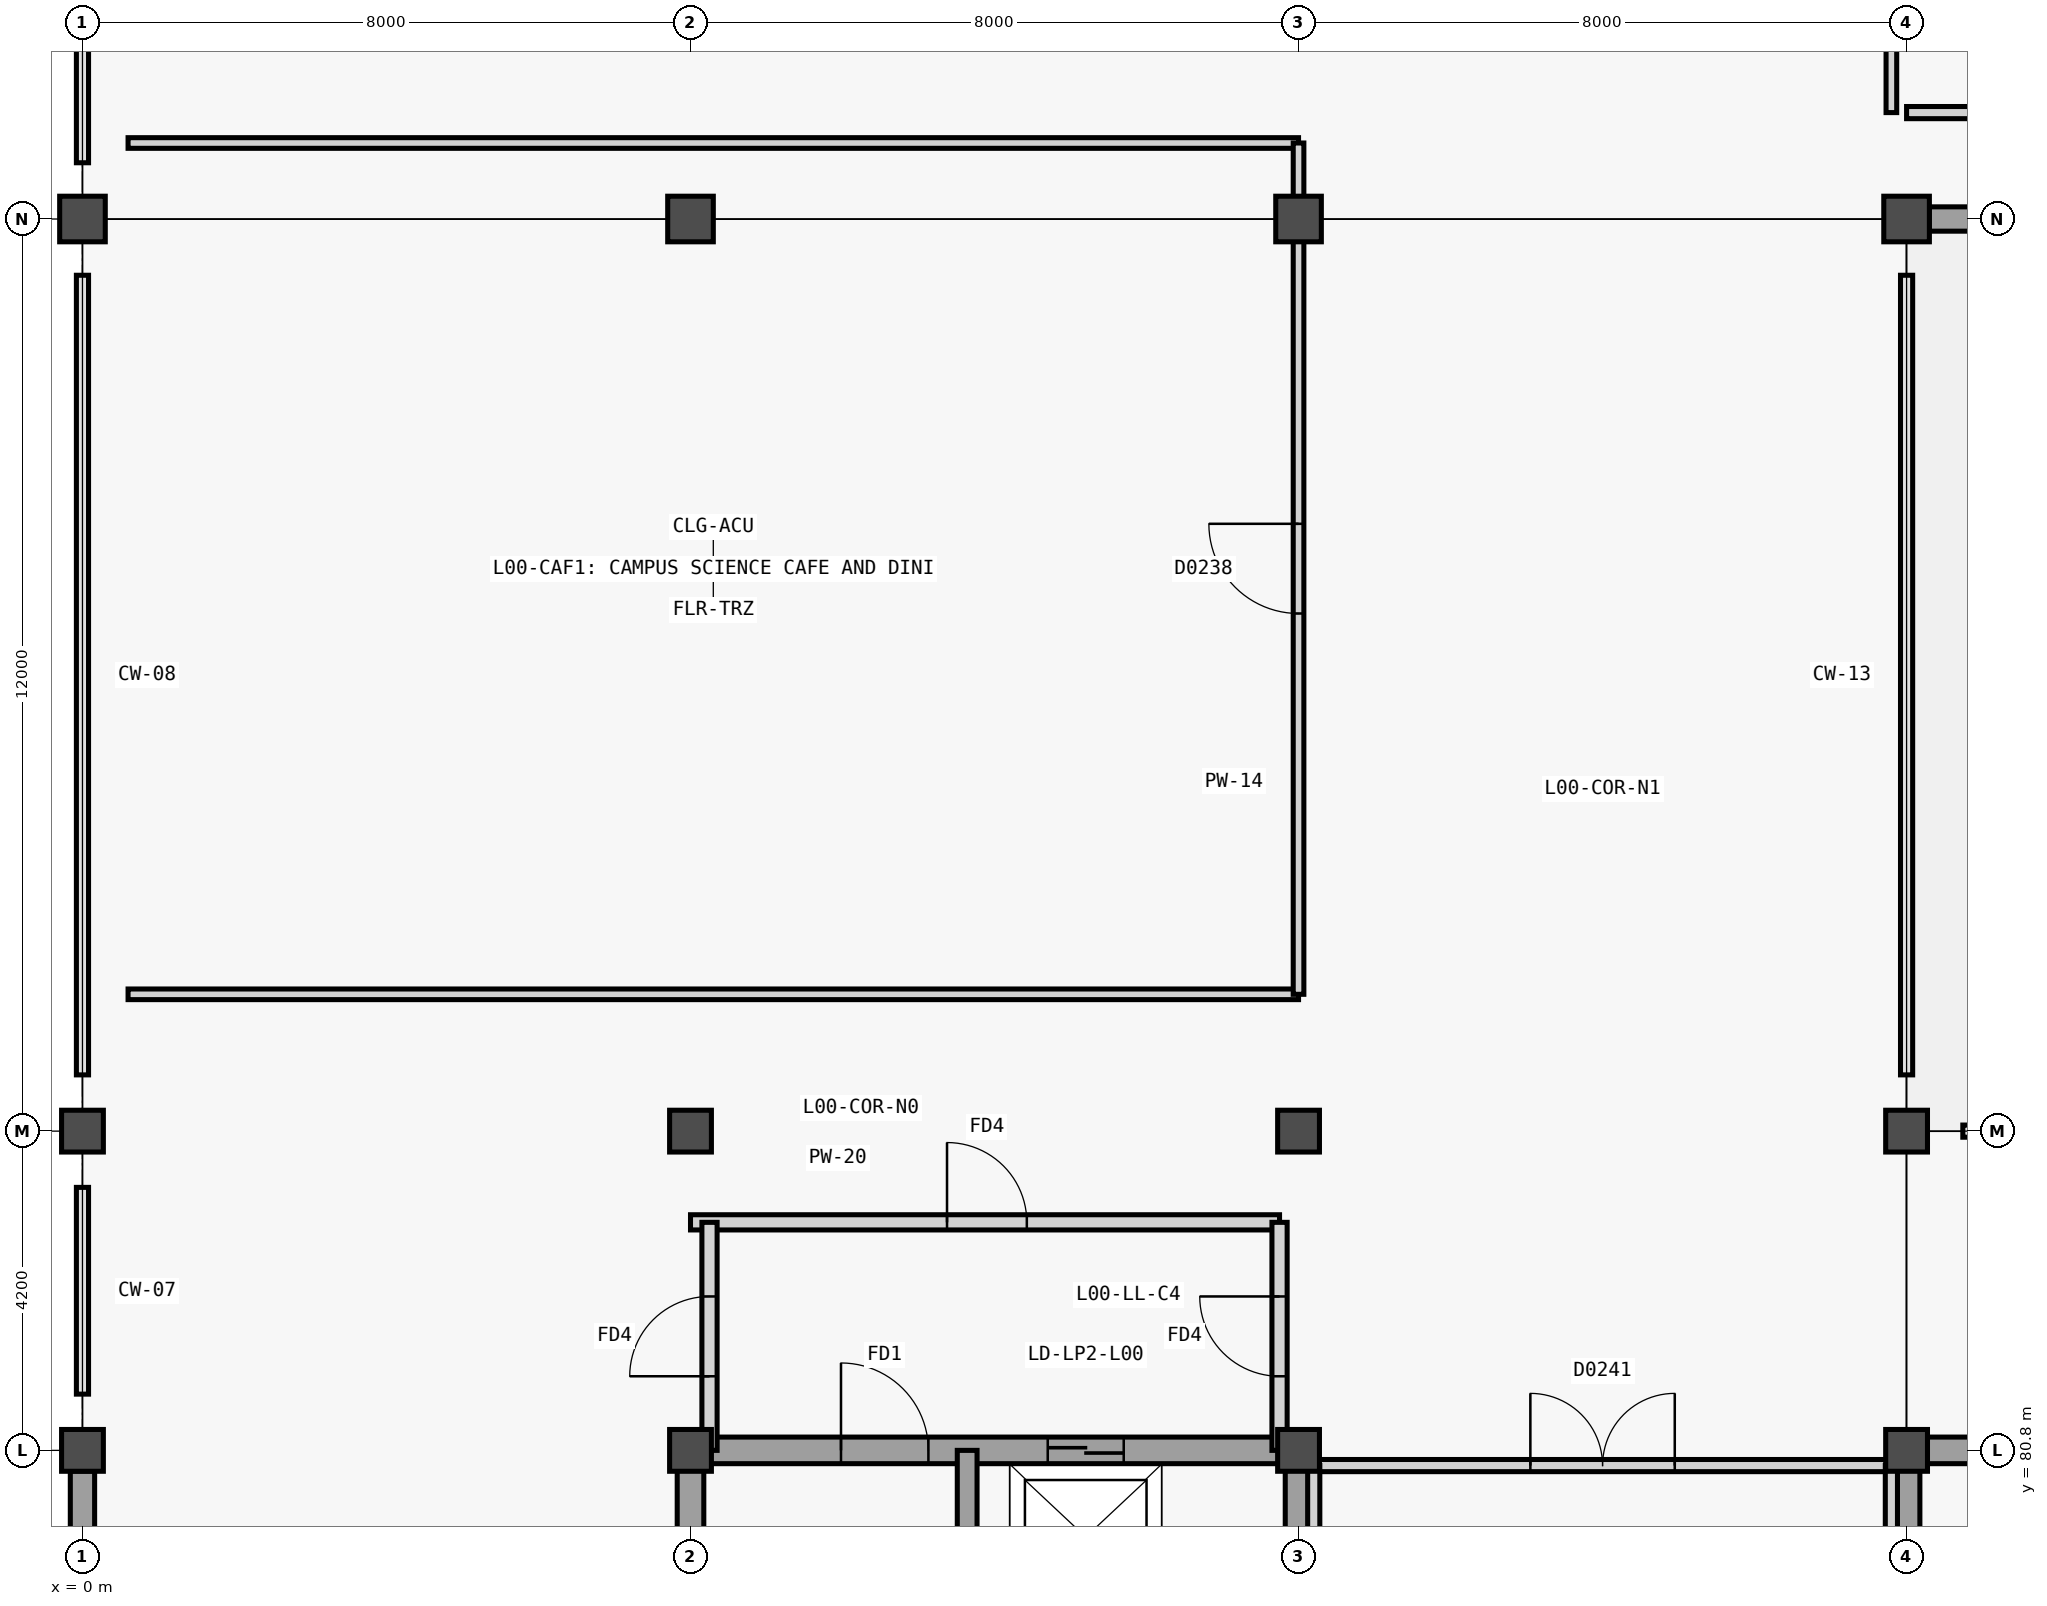
"""IFC4 building model, lengths in metres.
Left out: names, types, materials, properties, quantities, classifications, styles, units other than length and angle.
Written with IfcOpenShell. Run it as: python <this file> out.ifc"""

import sys

from ifc_helpers import new_model, si_unit, direction, frame, frame_2d, origin, origin_2d, place, context, subcontext, project, spatial, rectangle, extrude, element, fill, save


model = new_model("IFC4")
c1 = context("Model", 3, precision=1e-05, world=origin(), true_north=direction((0.0, 1.0)))
c2 = subcontext(c1, "Body", "Model", "MODEL_VIEW")
j1 = project(units=[si_unit("LENGTHUNIT", "METRE"), si_unit("PLANEANGLEUNIT", "RADIAN")], contexts=[c1])
p1 = place(None, origin())
s1 = spatial("IfcSite", under=j1, at=p1, CompositionType="ELEMENT")
p2 = place(p1, origin())
s2 = spatial("IfcBuilding", under=s1, at=p2, CompositionType="ELEMENT")
p3 = place(p2, origin())
s3 = spatial("IfcBuildingStorey", under=s2, at=p3, CompositionType="ELEMENT", Elevation=0.0)
for number, where, z_axis, x_axis in (
    (1, (0.0, 80.8, 0.0), (0.0, 0.0, 1.0), (1.0, 0.0, 0.0)),
    (2, (0.0, 85.0, 0.0), (0.0, 0.0, 1.0), (1.0, 0.0, 0.0)),
):
    element("IfcColumn", number, at=place(p3, frame(where, z_axis=z_axis, x_axis=x_axis)), inside=s3, PredefinedType="COLUMN", context=c2, shape_type="SweptSolid", body=[
        extrude(rectangle(XDim=0.55, YDim=0.55, at=origin_2d()), origin(), (0.0, 0.0, 1.0), 5.4),
    ])
p4 = place(p3, frame((0.0, 97.0, 0.0), z_axis=(0.0, 0.0, 1.0), x_axis=(1.0, 0.0, 0.0)))
e3 = element("IfcColumn", 3, at=p4, inside=s3, PredefinedType="COLUMN", context=c2, shape_type="SweptSolid", body=[
    extrude(rectangle(XDim=0.6, YDim=0.6, at=origin_2d()), origin(), (0.0, 0.0, 1.0), 5.4),
])
for number, where, z_axis, x_axis in (
    (4, (8.0, 80.8, 0.0), (0.0, 0.0, 1.0), (1.0, 0.0, 0.0)),
    (5, (8.0, 85.0, 0.0), (0.0, 0.0, 1.0), (1.0, 0.0, 0.0)),
):
    element("IfcColumn", number, at=place(p3, frame(where, z_axis=z_axis, x_axis=x_axis)), inside=s3, PredefinedType="COLUMN", context=c2, shape_type="SweptSolid", body=[
        extrude(rectangle(XDim=0.55, YDim=0.55, at=origin_2d()), origin(), (0.0, 0.0, 1.0), 5.4),
    ])
p5 = place(p3, frame((8.0, 97.0, 0.0), z_axis=(0.0, 0.0, 1.0), x_axis=(1.0, 0.0, 0.0)))
e6 = element("IfcColumn", 6, at=p5, inside=s3, PredefinedType="COLUMN", context=c2, shape_type="SweptSolid", body=[
    extrude(rectangle(XDim=0.6, YDim=0.6, at=origin_2d()), origin(), (0.0, 0.0, 1.0), 5.4),
])
for number, where, z_axis, x_axis in (
    (7, (16.0, 80.8, 0.0), (0.0, 0.0, 1.0), (1.0, 0.0, 0.0)),
    (8, (16.0, 85.0, 0.0), (0.0, 0.0, 1.0), (1.0, 0.0, 0.0)),
):
    element("IfcColumn", number, at=place(p3, frame(where, z_axis=z_axis, x_axis=x_axis)), inside=s3, PredefinedType="COLUMN", context=c2, shape_type="SweptSolid", body=[
        extrude(rectangle(XDim=0.55, YDim=0.55, at=origin_2d()), origin(), (0.0, 0.0, 1.0), 5.4),
    ])
p6 = place(p3, frame((16.0, 97.0, 0.0), z_axis=(0.0, 0.0, 1.0), x_axis=(1.0, 0.0, 0.0)))
e9 = element("IfcColumn", 9, at=p6, inside=s3, PredefinedType="COLUMN", context=c2, shape_type="SweptSolid", body=[
    extrude(rectangle(XDim=0.6, YDim=0.6, at=origin_2d()), origin(), (0.0, 0.0, 1.0), 5.4),
])
for number, where, z_axis, x_axis in (
    (10, (24.0, 80.8, 0.0), (0.0, 0.0, 1.0), (1.0, 0.0, 0.0)),
    (11, (24.0, 85.0, 0.0), (0.0, 0.0, 1.0), (1.0, 0.0, 0.0)),
):
    element("IfcColumn", number, at=place(p3, frame(where, z_axis=z_axis, x_axis=x_axis)), inside=s3, PredefinedType="COLUMN", context=c2, shape_type="SweptSolid", body=[
        extrude(rectangle(XDim=0.55, YDim=0.55, at=origin_2d()), origin(), (0.0, 0.0, 1.0), 5.4),
    ])
p7 = place(p3, frame((24.0, 97.0, 0.0), z_axis=(0.0, 0.0, 1.0), x_axis=(1.0, 0.0, 0.0)))
e12 = element("IfcColumn", 12, at=p7, inside=s3, PredefinedType="COLUMN", context=c2, shape_type="SweptSolid", body=[
    extrude(rectangle(XDim=0.6, YDim=0.6, at=origin_2d()), origin(), (0.0, 0.0, 1.0), 5.4),
])
p8 = place(p3, frame((0.0, 72.673, 0.0), z_axis=(0.0, 0.0, 1.0), x_axis=(0.0, 1.0, 0.0)))
e13 = element("IfcWall", 13, at=p8, inside=s3, PredefinedType="SOLIDWALL", context=c2, shape_type="SweptSolid", body=[
    extrude(rectangle(XDim=7.854, YDim=0.32, at=frame_2d((3.927, 0.0))), origin(), (0.0, 0.0, 1.0), 5.12),
])
p9 = place(p8, frame((2.307, 0.0, 0.0)))
e14 = element("IfcOpeningElement", 14, at=p9, cuts=e13, PredefinedType="OPENING", context=c2, shape_type="SweptSolid", body=[
    extrude(rectangle(XDim=1.65, YDim=2.2, at=frame_2d((0.825, 1.1))), frame((0.0, 0.17, 0.0), z_axis=(0.0, -1.0, 0.0), x_axis=(1.0, 0.0, 0.0)), (0.0, 0.0, 1.0), 0.34),
])
p10 = place(p3, frame((31.702, 97.0, 0.0), z_axis=(0.0, 0.0, 1.0), x_axis=(-1.0, 0.0, 0.0)))
e15 = element("IfcWall", 15, at=p10, inside=s3, PredefinedType="SOLIDWALL", context=c2, shape_type="SweptSolid", body=[
    extrude(rectangle(XDim=7.404, YDim=0.32, at=frame_2d((3.702, 0.0))), origin(), (0.0, 0.0, 1.0), 5.12),
])
p11 = place(p10, frame((2.422, 0.0, 0.0)))
e16 = element("IfcOpeningElement", 16, at=p11, cuts=e15, PredefinedType="OPENING", context=c2, shape_type="SweptSolid", body=[
    extrude(rectangle(XDim=2.0, YDim=2.4, at=frame_2d((1.0, 1.2))), frame((0.0, 0.17, 0.0), z_axis=(0.0, -1.0, 0.0), x_axis=(1.0, 0.0, 0.0)), (0.0, 0.0, 1.0), 0.34),
])
for number, where, z_axis, x_axis in (
    (17, (8.0, 72.4, 0.0), (0.0, 0.0, 1.0), (0.0, 1.0, 0.0)),
    (18, (16.0, 72.4, 0.0), (0.0, 0.0, 1.0), (0.0, 1.0, 0.0)),
):
    element("IfcWall", number, at=place(p3, frame(where, z_axis=z_axis, x_axis=x_axis)), inside=s3, PredefinedType="SHEAR", context=c2, shape_type="SweptSolid", body=[
        extrude(rectangle(XDim=8.4, YDim=0.35, at=frame_2d((4.2, 0.0))), origin(), (0.0, 0.0, 1.0), 5.4),
    ])
p12 = place(p3, frame((8.0, 80.8, 0.0), z_axis=(0.0, 0.0, 1.0), x_axis=(1.0, 0.0, 0.0)))
e19 = element("IfcWall", 19, at=p12, inside=s3, PredefinedType="SHEAR", context=c2, shape_type="SweptSolid", body=[
    extrude(rectangle(XDim=8.0, YDim=0.35, at=frame_2d((4.0, 0.0))), origin(), (0.0, 0.0, 1.0), 5.4),
])
p13 = place(p12, frame((1.98, 0.0, 0.0)))
e20 = element("IfcOpeningElement", 20, at=p13, cuts=e19, PredefinedType="OPENING", context=c2, shape_type="SweptSolid", body=[
    extrude(rectangle(XDim=1.15, YDim=2.2, at=frame_2d((0.575, 1.1))), frame((0.0, 0.185, 0.0), z_axis=(0.0, -1.0, 0.0), x_axis=(1.0, 0.0, 0.0)), (0.0, 0.0, 1.0), 0.37),
])
p14 = place(p12, frame((4.7, 0.0, 0.0)))
e21 = element("IfcOpeningElement", 21, at=p14, cuts=e19, PredefinedType="OPENING", context=c2, shape_type="SweptSolid", body=[
    extrude(rectangle(XDim=1.0, YDim=2.15, at=frame_2d((0.5, 1.075))), frame((0.0, 0.185, 0.0), z_axis=(0.0, -1.0, 0.0), x_axis=(1.0, 0.0, 0.0)), (0.0, 0.0, 1.0), 0.37),
])
p15 = place(p3, frame((11.64, 72.4, 0.0), z_axis=(0.0, 0.0, 1.0), x_axis=(0.0, 1.0, 0.0)))
e22 = element("IfcWall", 22, at=p15, inside=s3, PredefinedType="SHEAR", context=c2, shape_type="SweptSolid", body=[
    extrude(rectangle(XDim=8.4, YDim=0.26, at=frame_2d((4.2, 0.0))), origin(), (0.0, 0.0, 1.0), 5.4),
])
p16 = place(p3, frame((8.0, 83.8, 0.0), z_axis=(0.0, 0.0, 1.0), x_axis=(1.0, 0.0, 0.0)))
e23 = element("IfcWall", 23, at=p16, inside=s3, PredefinedType="PARTITIONING", context=c2, shape_type="SweptSolid", body=[
    extrude(rectangle(XDim=7.75, YDim=0.2, at=frame_2d((3.875, 0.0))), origin(), (0.0, 0.0, 1.0), 5.12),
])
p17 = place(p16, frame((3.375, 0.0, 0.0)))
e24 = element("IfcOpeningElement", 24, at=p17, cuts=e23, PredefinedType="OPENING", context=c2, shape_type="SweptSolid", body=[
    extrude(rectangle(XDim=1.05, YDim=2.15, at=frame_2d((0.525, 1.075))), frame((0.0, 0.11, 0.0), z_axis=(0.0, -1.0, 0.0), x_axis=(1.0, 0.0, 0.0)), (0.0, 0.0, 1.0), 0.22),
])
p18 = place(p3, frame((15.75, 80.8, 0.0), z_axis=(0.0, 0.0, 1.0), x_axis=(0.0, 1.0, 0.0)))
e25 = element("IfcWall", 25, at=p18, inside=s3, PredefinedType="PARTITIONING", context=c2, shape_type="SweptSolid", body=[
    extrude(rectangle(XDim=3.0, YDim=0.2, at=frame_2d((1.5, 0.0))), origin(), (0.0, 0.0, 1.0), 4.49),
])
p19 = place(p18, frame((0.975, 0.0, 0.0)))
e26 = element("IfcOpeningElement", 26, at=p19, cuts=e25, PredefinedType="OPENING", context=c2, shape_type="SweptSolid", body=[
    extrude(rectangle(XDim=1.05, YDim=2.15, at=frame_2d((0.525, 1.075))), frame((0.0, 0.11, 0.0), z_axis=(0.0, -1.0, 0.0), x_axis=(1.0, 0.0, 0.0)), (0.0, 0.0, 1.0), 0.22),
])
p20 = place(p3, frame((8.25, 80.8, 0.0), z_axis=(0.0, 0.0, 1.0), x_axis=(0.0, 1.0, 0.0)))
e27 = element("IfcWall", 27, at=p20, inside=s3, PredefinedType="PARTITIONING", context=c2, shape_type="SweptSolid", body=[
    extrude(rectangle(XDim=3.0, YDim=0.2, at=frame_2d((1.5, 0.0))), origin(), (0.0, 0.0, 1.0), 4.49),
])
p21 = place(p20, frame((0.975, 0.0, 0.0)))
e28 = element("IfcOpeningElement", 28, at=p21, cuts=e27, PredefinedType="OPENING", context=c2, shape_type="SweptSolid", body=[
    extrude(rectangle(XDim=1.05, YDim=2.15, at=frame_2d((0.525, 1.075))), frame((0.0, 0.11, 0.0), z_axis=(0.0, -1.0, 0.0), x_axis=(1.0, 0.0, 0.0)), (0.0, 0.0, 1.0), 0.22),
])
p22 = place(p3, frame((24.0, 72.4, 0.0), z_axis=(0.0, 0.0, 1.0), x_axis=(0.0, 1.0, 0.0)))
e29 = element("IfcWall", 29, at=p22, inside=s3, PredefinedType="SHEAR", context=c2, shape_type="SweptSolid", body=[
    extrude(rectangle(XDim=8.4, YDim=0.35, at=frame_2d((4.2, 0.0))), origin(), (0.0, 0.0, 1.0), 5.4),
])
p23 = place(p3, frame((24.0, 80.8, 0.0), z_axis=(0.0, 0.0, 1.0), x_axis=(1.0, 0.0, 0.0)))
e30 = element("IfcWall", 30, at=p23, inside=s3, PredefinedType="SHEAR", context=c2, shape_type="SweptSolid", body=[
    extrude(rectangle(XDim=8.0, YDim=0.35, at=frame_2d((4.0, 0.0))), origin(), (0.0, 0.0, 1.0), 5.4),
])
p24 = place(p23, frame((2.04, 0.0, 0.0)))
e31 = element("IfcOpeningElement", 31, at=p24, cuts=e30, PredefinedType="OPENING", context=c2, shape_type="SweptSolid", body=[
    extrude(rectangle(XDim=1.15, YDim=2.2, at=frame_2d((0.575, 1.1))), frame((0.0, 0.185, 0.0), z_axis=(0.0, -1.0, 0.0), x_axis=(1.0, 0.0, 0.0)), (0.0, 0.0, 1.0), 0.37),
])
for number, where, z_axis, x_axis in (
    (32, (0.6, 86.8, 0.0), (0.0, 0.0, 1.0), (1.0, 0.0, 0.0)),
    (33, (0.6, 98.0, 0.0), (0.0, 0.0, 1.0), (1.0, 0.0, 0.0)),
):
    element("IfcWall", number, at=place(p3, frame(where, z_axis=z_axis, x_axis=x_axis)), inside=s3, PredefinedType="PARTITIONING", context=c2, shape_type="SweptSolid", body=[
        extrude(rectangle(XDim=15.4, YDim=0.14, at=frame_2d((7.7, 0.0))), origin(), (0.0, 0.0, 1.0), 5.14),
    ])
p25 = place(p3, frame((16.0, 86.8, 0.0), z_axis=(0.0, 0.0, 1.0), x_axis=(0.0, 1.0, 0.0)))
e34 = element("IfcWall", 34, at=p25, inside=s3, PredefinedType="PARTITIONING", context=c2, shape_type="SweptSolid", body=[
    extrude(rectangle(XDim=11.2, YDim=0.14, at=frame_2d((5.6, 0.0))), origin(), (0.0, 0.0, 1.0), 4.39),
])
p26 = place(p25, frame((5.01, 0.0, 0.0)))
e35 = element("IfcOpeningElement", 35, at=p26, cuts=e34, PredefinedType="OPENING", context=c2, shape_type="SweptSolid", body=[
    extrude(rectangle(XDim=1.18, YDim=2.18, at=frame_2d((0.59, 1.09))), frame((0.0, 0.08, 0.0), z_axis=(0.0, -1.0, 0.0), x_axis=(1.0, 0.0, 0.0)), (0.0, 0.0, 1.0), 0.16),
])
p27 = place(p3, frame((23.8, 98.4, 0.0), z_axis=(0.0, 0.0, 1.0), x_axis=(0.0, 1.0, 0.0)))
e36 = element("IfcWall", 36, at=p27, inside=s3, PredefinedType="PARTITIONING", context=c2, shape_type="SweptSolid", body=[
    extrude(rectangle(XDim=12.0, YDim=0.14, at=frame_2d((6.0, 0.0))), origin(), (0.0, 0.0, 1.0), 4.49),
])
p28 = place(p3, frame((24.0, 98.4, 0.0), z_axis=(0.0, 0.0, 1.0), x_axis=(1.0, 0.0, 0.0)))
e37 = element("IfcWall", 37, at=p28, inside=s3, PredefinedType="PARTITIONING", context=c2, shape_type="SweptSolid", body=[
    extrude(rectangle(XDim=48.2, YDim=0.16, at=frame_2d((24.1, 0.0))), origin(), (0.0, 0.0, 1.0), 5.14),
])
p29 = place(p28, frame((0.849, 0.0, 0.0)))
e38 = element("IfcOpeningElement", 38, at=p29, cuts=e37, PredefinedType="OPENING", context=c2, shape_type="SweptSolid", body=[
    extrude(rectangle(XDim=1.9, YDim=2.3, at=frame_2d((0.95, 1.15))), frame((0.0, 0.09, 0.0), z_axis=(0.0, -1.0, 0.0), x_axis=(1.0, 0.0, 0.0)), (0.0, 0.0, 1.0), 0.18),
])
p30 = place(p3, frame((16.2, 80.6, 0.0), z_axis=(0.0, 0.0, 1.0), x_axis=(1.0, 0.0, 0.0)))
e39 = element("IfcWall", 39, at=p30, inside=s3, PredefinedType="PARTITIONING", context=c2, shape_type="SweptSolid", body=[
    extrude(rectangle(XDim=7.6, YDim=0.16, at=frame_2d((3.8, 0.0))), origin(), (0.0, 0.0, 1.0), 4.39),
])
p31 = place(p30, frame((2.85, 0.0, 0.0)))
e40 = element("IfcOpeningElement", 40, at=p31, cuts=e39, PredefinedType="OPENING", context=c2, shape_type="SweptSolid", body=[
    extrude(rectangle(XDim=1.9, YDim=2.3, at=frame_2d((0.95, 1.15))), frame((0.0, 0.09, 0.0), z_axis=(0.0, -1.0, 0.0), x_axis=(1.0, 0.0, 0.0)), (0.0, 0.0, 1.0), 0.18),
])
p32 = place(p3, frame((16.2, 64.5, 0.0), z_axis=(0.0, 0.0, 1.0), x_axis=(0.0, 1.0, 0.0)))
e41 = element("IfcWall", 41, at=p32, inside=s3, PredefinedType="PARTITIONING", context=c2, shape_type="SweptSolid", body=[
    extrude(rectangle(XDim=16.1, YDim=0.16, at=frame_2d((8.05, 0.0))), origin(), (0.0, 0.0, 1.0), 4.39),
])
p33 = place(p3, frame((23.8, 64.5, 0.0), z_axis=(0.0, 0.0, 1.0), x_axis=(0.0, 1.0, 0.0)))
e42 = element("IfcWall", 42, at=p33, inside=s3, PredefinedType="PARTITIONING", context=c2, shape_type="SweptSolid", body=[
    extrude(rectangle(XDim=16.1, YDim=0.16, at=frame_2d((8.05, 0.0))), origin(), (0.0, 0.0, 1.0), 4.37),
])
p34 = place(p13, origin())
e43 = element("IfcDoor", 43, at=p34, inside=s3, OperationType="SINGLE_SWING_LEFT", PredefinedType="DOOR", context=c2, shape_type="SweptSolid", body=[
    extrude(rectangle(XDim=1.15, YDim=2.2, at=frame_2d((0.575, 1.1))), frame((0.0, 0.025, 0.0), z_axis=(0.0, -1.0, 0.0), x_axis=(1.0, 0.0, 0.0)), (0.0, 0.0, 1.0), 0.05),
])
fill(e20, e43)
p35 = place(p14, origin())
e44 = element("IfcDoor", 44, at=p35, inside=s3, OperationType="DOUBLE_DOOR_SLIDING", PredefinedType="DOOR", context=c2, shape_type="SweptSolid", body=[
    extrude(rectangle(XDim=1.0, YDim=2.15, at=frame_2d((0.5, 1.075))), frame((0.0, 0.025, 0.0), z_axis=(0.0, -1.0, 0.0), x_axis=(1.0, 0.0, 0.0)), (0.0, 0.0, 1.0), 0.05),
])
fill(e21, e44)
p36 = place(p17, origin())
e45 = element("IfcDoor", 45, at=p36, inside=s3, OperationType="SINGLE_SWING_LEFT", PredefinedType="DOOR", context=c2, shape_type="SweptSolid", body=[
    extrude(rectangle(XDim=1.05, YDim=2.15, at=frame_2d((0.525, 1.075))), frame((0.0, 0.025, 0.0), z_axis=(0.0, -1.0, 0.0), x_axis=(1.0, 0.0, 0.0)), (0.0, 0.0, 1.0), 0.05),
])
fill(e24, e45)
p37 = place(p19, origin())
e46 = element("IfcDoor", 46, at=p37, inside=s3, OperationType="SINGLE_SWING_RIGHT", PredefinedType="DOOR", context=c2, shape_type="SweptSolid", body=[
    extrude(rectangle(XDim=1.05, YDim=2.15, at=frame_2d((0.525, 1.075))), frame((0.0, 0.025, 0.0), z_axis=(0.0, -1.0, 0.0), x_axis=(1.0, 0.0, 0.0)), (0.0, 0.0, 1.0), 0.05),
])
fill(e26, e46)
p38 = place(p21, origin())
e47 = element("IfcDoor", 47, at=p38, inside=s3, OperationType="SINGLE_SWING_LEFT", PredefinedType="DOOR", context=c2, shape_type="SweptSolid", body=[
    extrude(rectangle(XDim=1.05, YDim=2.15, at=frame_2d((0.525, 1.075))), frame((0.0, 0.025, 0.0), z_axis=(0.0, -1.0, 0.0), x_axis=(1.0, 0.0, 0.0)), (0.0, 0.0, 1.0), 0.05),
])
fill(e28, e47)
p39 = place(p26, origin())
e48 = element("IfcDoor", 48, at=p39, inside=s3, OperationType="SINGLE_SWING_RIGHT", PredefinedType="DOOR", context=c2, shape_type="SweptSolid", body=[
    extrude(rectangle(XDim=1.18, YDim=2.18, at=frame_2d((0.59, 1.09))), frame((0.0, 0.025, 0.0), z_axis=(0.0, -1.0, 0.0), x_axis=(1.0, 0.0, 0.0)), (0.0, 0.0, 1.0), 0.05),
])
fill(e35, e48)
p40 = place(p31, origin())
e49 = element("IfcDoor", 49, at=p40, inside=s3, OperationType="DOUBLE_DOOR_SINGLE_SWING", PredefinedType="DOOR", context=c2, shape_type="SweptSolid", body=[
    extrude(rectangle(XDim=1.9, YDim=2.3, at=frame_2d((0.95, 1.15))), frame((0.0, 0.025, 0.0), z_axis=(0.0, -1.0, 0.0), x_axis=(1.0, 0.0, 0.0)), (0.0, 0.0, 1.0), 0.05),
])
fill(e40, e49)
save(model, sys.argv[1])
